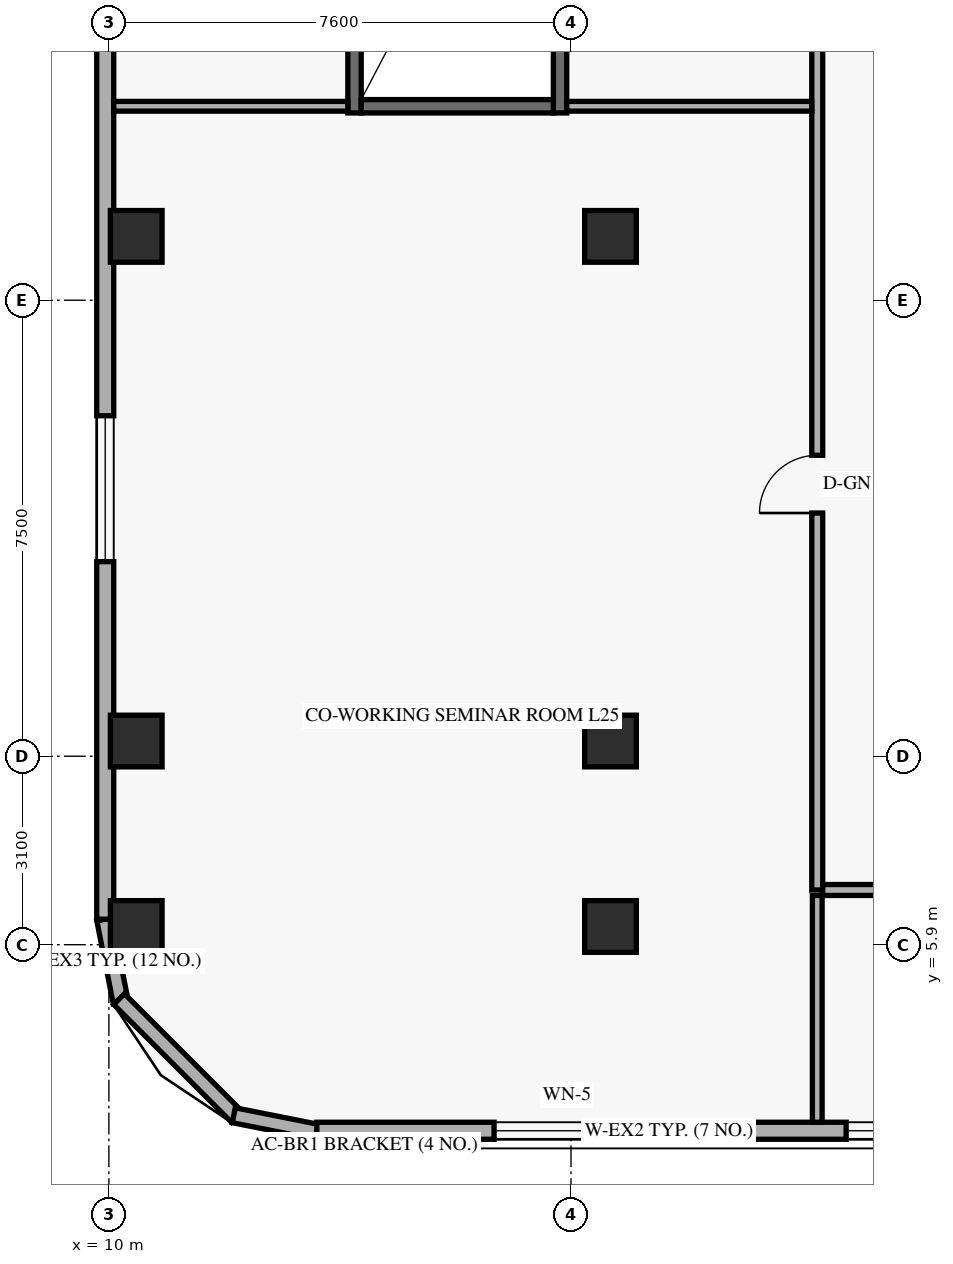
"""IFC4 building model, lengths in metres.
Left out: names, types, materials, properties, quantities, classifications, styles, units other than length and angle.
Written with IfcOpenShell. Run it as: python <this file> out.ifc"""

import sys

from ifc_helpers import new_model, si_unit, direction, frame, frame_2d, origin, origin_2d, place, context, subcontext, project, spatial, rectangle, extrude, element, fill, save


model = new_model("IFC4")
c1 = context("Model", 3, precision=1e-05, world=origin(), true_north=direction((0.0, 1.0)))
c2 = subcontext(c1, "Body", "Model", "MODEL_VIEW")
j1 = project(units=[si_unit("LENGTHUNIT", "METRE"), si_unit("PLANEANGLEUNIT", "RADIAN")], contexts=[c1])
p1 = place(None, origin())
s1 = spatial("IfcSite", under=j1, at=p1, CompositionType="ELEMENT")
p2 = place(p1, origin())
s2 = spatial("IfcBuilding", under=s1, at=p2, CompositionType="ELEMENT")
p3 = place(p2, frame((0.0, 0.0, 98.4)))
s3 = spatial("IfcBuildingStorey", under=s2, at=p3, CompositionType="ELEMENT", Elevation=98.4)
for number, where, z_axis, x_axis in (
    (1, (14.04, 19.58, 0.0), (0.0, 0.0, 1.0), (0.0, 1.0, 0.0)),
    (2, (17.42, 19.58, 0.0), (0.0, 0.0, 1.0), (0.0, 1.0, 0.0)),
):
    element("IfcWall", number, at=place(p3, frame(where, z_axis=z_axis, x_axis=x_axis)), inside=s3, PredefinedType="SHEAR", context=c2, shape_type="SweptSolid", body=[
        extrude(rectangle(XDim=7.98, YDim=0.22, at=frame_2d((3.99, 0.0))), origin(), (0.0, 0.0, 1.0), 3.96),
    ])
p4 = place(p3, frame((14.15, 19.69, 0.0), z_axis=(0.0, 0.0, 1.0), x_axis=(1.0, 0.0, 0.0)))
e3 = element("IfcWall", 3, at=p4, inside=s3, PredefinedType="SHEAR", context=c2, shape_type="SweptSolid", body=[
    extrude(rectangle(XDim=3.16, YDim=0.22, at=frame_2d((1.58, 0.0))), origin(), (0.0, 0.0, 1.0), 3.96),
])
for number, where, z_axis, x_axis in (
    (4, (10.45, 6.2, 0.0), (0.0, 0.0, 1.0), (1.0, 0.0, 0.0)),
    (5, (10.45, 9.25, 0.0), (0.0, 0.0, 1.0), (1.0, 0.0, 0.0)),
    (6, (10.45, 17.55, 0.0), (0.0, 0.0, 1.0), (1.0, 0.0, 0.0)),
    (7, (18.25, 6.2, 0.0), (0.0, 0.0, 1.0), (1.0, 0.0, 0.0)),
    (8, (18.25, 9.25, 0.0), (0.0, 0.0, 1.0), (1.0, 0.0, 0.0)),
    (9, (18.25, 17.55, 0.0), (0.0, 0.0, 1.0), (1.0, 0.0, 0.0)),
):
    element("IfcColumn", number, at=place(p3, frame(where, z_axis=z_axis, x_axis=x_axis)), inside=s3, PredefinedType="COLUMN", context=c2, shape_type="SweptSolid", body=[
        extrude(rectangle(XDim=0.85, YDim=0.85, at=origin_2d()), origin(), (0.0, 0.0, 1.0), 4.2),
    ])
p5 = place(p3, frame((9.924, 6.316, 0.0), z_axis=(0.0, 0.0, 1.0), x_axis=(0.195000137217, -0.980803214965, 0.0)))
e10 = element("IfcWall", 10, at=p5, inside=s3, PredefinedType="SOLIDWALL", context=c2, shape_type="SweptSolid", body=[
    extrude(rectangle(XDim=1.388, YDim=0.25, at=frame_2d((0.694, 0.0))), origin(), (0.0, 0.0, 1.0), 3.96),
])
p6 = place(p3, frame((10.168, 5.005, 0.0), z_axis=(0.0, 0.0, 1.0), x_axis=(0.707151344399, -0.707062215165, 0.0)))
e11 = element("IfcWall", 11, at=p6, inside=s3, PredefinedType="SOLIDWALL", context=c2, shape_type="SweptSolid", body=[
    extrude(rectangle(XDim=2.739, YDim=0.25, at=frame_2d((1.37, 0.0))), origin(), (0.0, 0.0, 1.0), 3.96),
])
p7 = place(p3, frame((12.054, 3.095, 0.0), z_axis=(0.0, 0.0, 1.0), x_axis=(0.980809899341, -0.19496651342, 0.0)))
e12 = element("IfcWall", 12, at=p7, inside=s3, PredefinedType="SOLIDWALL", context=c2, shape_type="SweptSolid", body=[
    extrude(rectangle(XDim=1.389, YDim=0.25, at=frame_2d((0.694, 0.0))), origin(), (0.0, 0.0, 1.0), 3.96),
])
p8 = place(p3, frame((13.42, 2.84, 0.0), z_axis=(0.0, 0.0, 1.0), x_axis=(1.0, 0.0, 0.0)))
e13 = element("IfcWall", 13, at=p8, inside=s3, PredefinedType="SOLIDWALL", context=c2, shape_type="SweptSolid", body=[
    extrude(rectangle(XDim=11.58, YDim=0.28, at=frame_2d((5.79, 0.0))), origin(), (0.0, 0.0, 1.0), 3.96),
])
p9 = place(p8, frame((2.915, 0.0, 0.85)))
e14 = element("IfcOpeningElement", 14, at=p9, cuts=e13, PredefinedType="OPENING", context=c2, shape_type="SweptSolid", body=[
    extrude(rectangle(XDim=2.4, YDim=1.9, at=frame_2d((1.2, 0.95))), frame((0.0, 0.15, 0.0), z_axis=(0.0, -1.0, 0.0), x_axis=(1.0, 0.0, 0.0)), (0.0, 0.0, 1.0), 0.3),
])
p10 = place(p8, frame((8.705, 0.0, 0.85)))
e15 = element("IfcOpeningElement", 15, at=p10, cuts=e13, PredefinedType="OPENING", context=c2, shape_type="SweptSolid", body=[
    extrude(rectangle(XDim=2.4, YDim=1.9, at=frame_2d((1.2, 0.95))), frame((0.0, 0.15, 0.0), z_axis=(0.0, -1.0, 0.0), x_axis=(1.0, 0.0, 0.0)), (0.0, 0.0, 1.0), 0.3),
])
p11 = place(p3, frame((9.94, 41.68, 0.0), z_axis=(0.0, 0.0, 1.0), x_axis=(0.0, -1.0, 0.0)))
e16 = element("IfcWall", 16, at=p11, inside=s3, PredefinedType="SOLIDWALL", context=c2, shape_type="SweptSolid", body=[
    extrude(rectangle(XDim=35.36, YDim=0.28, at=frame_2d((17.68, 0.0))), origin(), (0.0, 0.0, 1.0), 3.96),
])
p12 = place(p11, frame((27.08, 0.0, 0.85)))
e17 = element("IfcOpeningElement", 17, at=p12, cuts=e16, PredefinedType="OPENING", context=c2, shape_type="SweptSolid", body=[
    extrude(rectangle(XDim=2.4, YDim=1.9, at=frame_2d((1.2, 0.95))), frame((0.0, 0.15, 0.0), z_axis=(0.0, -1.0, 0.0), x_axis=(1.0, 0.0, 0.0)), (0.0, 0.0, 1.0), 0.3),
])
p13 = place(p11, frame((15.94, 0.0, 0.85)))
e18 = element("IfcOpeningElement", 18, at=p13, cuts=e16, PredefinedType="OPENING", context=c2, shape_type="SweptSolid", body=[
    extrude(rectangle(XDim=2.4, YDim=1.9, at=frame_2d((1.2, 0.95))), frame((0.0, 0.15, 0.0), z_axis=(0.0, -1.0, 0.0), x_axis=(1.0, 0.0, 0.0)), (0.0, 0.0, 1.0), 0.3),
])
p14 = place(p11, frame((6.005, 0.0, 0.85)))
e19 = element("IfcOpeningElement", 19, at=p14, cuts=e16, PredefinedType="OPENING", context=c2, shape_type="SweptSolid", body=[
    extrude(rectangle(XDim=2.4, YDim=1.9, at=frame_2d((1.2, 0.95))), frame((0.0, 0.15, 0.0), z_axis=(0.0, -1.0, 0.0), x_axis=(1.0, 0.0, 0.0)), (0.0, 0.0, 1.0), 0.3),
])
p15 = place(p3, frame((21.65, 6.8, 0.0), z_axis=(0.0, 0.0, 1.0), x_axis=(0.0, 1.0, 0.0)))
e20 = element("IfcWall", 20, at=p15, inside=s3, PredefinedType="STANDARD", context=c2, shape_type="SweptSolid", body=[
    extrude(rectangle(XDim=34.4, YDim=0.18, at=frame_2d((17.2, 0.0))), origin(), (0.0, 0.0, 1.0), 3.331),
])
p16 = place(p15, frame((15.2, 0.0, 0.0)))
e21 = element("IfcOpeningElement", 21, at=p16, cuts=e20, PredefinedType="OPENING", context=c2, shape_type="SweptSolid", body=[
    extrude(rectangle(XDim=0.95, YDim=2.15, at=frame_2d((0.475, 1.075))), frame((0.0, 0.1, 0.0), z_axis=(0.0, -1.0, 0.0), x_axis=(1.0, 0.0, 0.0)), (0.0, 0.0, 1.0), 0.2),
])
p17 = place(p15, frame((6.2, 0.0, 0.0)))
e22 = element("IfcOpeningElement", 22, at=p17, cuts=e20, PredefinedType="OPENING", context=c2, shape_type="SweptSolid", body=[
    extrude(rectangle(XDim=0.95, YDim=2.15, at=frame_2d((0.475, 1.075))), frame((0.0, 0.1, 0.0), z_axis=(0.0, -1.0, 0.0), x_axis=(1.0, 0.0, 0.0)), (0.0, 0.0, 1.0), 0.2),
])
p18 = place(p15, frame((26.5, 0.0, 0.0)))
e23 = element("IfcOpeningElement", 23, at=p18, cuts=e20, PredefinedType="OPENING", context=c2, shape_type="SweptSolid", body=[
    extrude(rectangle(XDim=0.95, YDim=2.15, at=frame_2d((0.475, 1.075))), frame((0.0, 0.1, 0.0), z_axis=(0.0, -1.0, 0.0), x_axis=(1.0, 0.0, 0.0)), (0.0, 0.0, 1.0), 0.2),
])
p19 = place(p3, frame((21.74, 6.8, 0.0), z_axis=(0.0, 0.0, 1.0), x_axis=(1.0, 0.0, 0.0)))
e24 = element("IfcWall", 24, at=p19, inside=s3, PredefinedType="STANDARD", context=c2, shape_type="SweptSolid", body=[
    extrude(rectangle(XDim=15.57, YDim=0.18, at=frame_2d((7.785, 0.0))), origin(), (0.0, 0.0, 1.0), 3.331),
])
p20 = place(p19, frame((5.41, 0.0, 0.0)))
e25 = element("IfcOpeningElement", 25, at=p20, cuts=e24, PredefinedType="OPENING", context=c2, shape_type="SweptSolid", body=[
    extrude(rectangle(XDim=0.95, YDim=2.15, at=frame_2d((0.475, 1.075))), frame((0.0, 0.1, 0.0), z_axis=(0.0, -1.0, 0.0), x_axis=(1.0, 0.0, 0.0)), (0.0, 0.0, 1.0), 0.2),
])
p21 = place(p3, frame((21.65, 2.98, 0.0), z_axis=(0.0, 0.0, 1.0), x_axis=(0.0, 1.0, 0.0)))
e26 = element("IfcWall", 26, at=p21, inside=s3, PredefinedType="PARTITIONING", context=c2, shape_type="SweptSolid", body=[
    extrude(rectangle(XDim=3.73, YDim=0.16, at=frame_2d((1.865, 0.0))), origin(), (0.0, 0.0, 1.0), 3.409),
])
p22 = place(p3, frame((10.08, 19.69, 0.0), z_axis=(0.0, 0.0, 1.0), x_axis=(1.0, 0.0, 0.0)))
e27 = element("IfcWall", 27, at=p22, inside=s3, PredefinedType="PARTITIONING", context=c2, shape_type="SweptSolid", body=[
    extrude(rectangle(XDim=3.85, YDim=0.16, at=frame_2d((1.925, 0.0))), origin(), (0.0, 0.0, 1.0), 3.409),
])
p23 = place(p3, frame((17.53, 19.69, 0.0), z_axis=(0.0, 0.0, 1.0), x_axis=(1.0, 0.0, 0.0)))
e28 = element("IfcWall", 28, at=p23, inside=s3, PredefinedType="PARTITIONING", context=c2, shape_type="SweptSolid", body=[
    extrude(rectangle(XDim=4.03, YDim=0.16, at=frame_2d((2.015, 0.0))), origin(), (0.0, 0.0, 1.0), 3.331),
])
p24 = place(p9, origin())
e29 = element("IfcWindow", 29, at=p24, inside=s3, PartitioningType="SINGLE_PANEL", PredefinedType="WINDOW", context=c2, shape_type="SweptSolid", body=[
    extrude(rectangle(XDim=2.4, YDim=1.9, at=frame_2d((1.2, 0.95))), frame((0.0, 0.03, 0.0), z_axis=(0.0, -1.0, 0.0), x_axis=(1.0, 0.0, 0.0)), (0.0, 0.0, 1.0), 0.06),
])
fill(e14, e29)
p25 = place(p10, origin())
e30 = element("IfcWindow", 30, at=p25, inside=s3, PartitioningType="SINGLE_PANEL", PredefinedType="WINDOW", context=c2, shape_type="SweptSolid", body=[
    extrude(rectangle(XDim=2.4, YDim=1.9, at=frame_2d((1.2, 0.95))), frame((0.0, 0.03, 0.0), z_axis=(0.0, -1.0, 0.0), x_axis=(1.0, 0.0, 0.0)), (0.0, 0.0, 1.0), 0.06),
])
fill(e15, e30)
p26 = place(p12, origin())
e31 = element("IfcWindow", 31, at=p26, inside=s3, PartitioningType="SINGLE_PANEL", PredefinedType="WINDOW", context=c2, shape_type="SweptSolid", body=[
    extrude(rectangle(XDim=2.4, YDim=1.9, at=frame_2d((1.2, 0.95))), frame((0.0, 0.03, 0.0), z_axis=(0.0, -1.0, 0.0), x_axis=(1.0, 0.0, 0.0)), (0.0, 0.0, 1.0), 0.06),
])
fill(e17, e31)
p27 = place(p17, origin())
e32 = element("IfcDoor", 32, at=p27, inside=s3, OperationType="SINGLE_SWING_LEFT", PredefinedType="DOOR", context=c2, shape_type="SweptSolid", body=[
    extrude(rectangle(XDim=0.95, YDim=2.15, at=frame_2d((0.475, 1.075))), frame((0.0, 0.025, 0.0), z_axis=(0.0, -1.0, 0.0), x_axis=(1.0, 0.0, 0.0)), (0.0, 0.0, 1.0), 0.05),
])
fill(e22, e32)
save(model, sys.argv[1])
